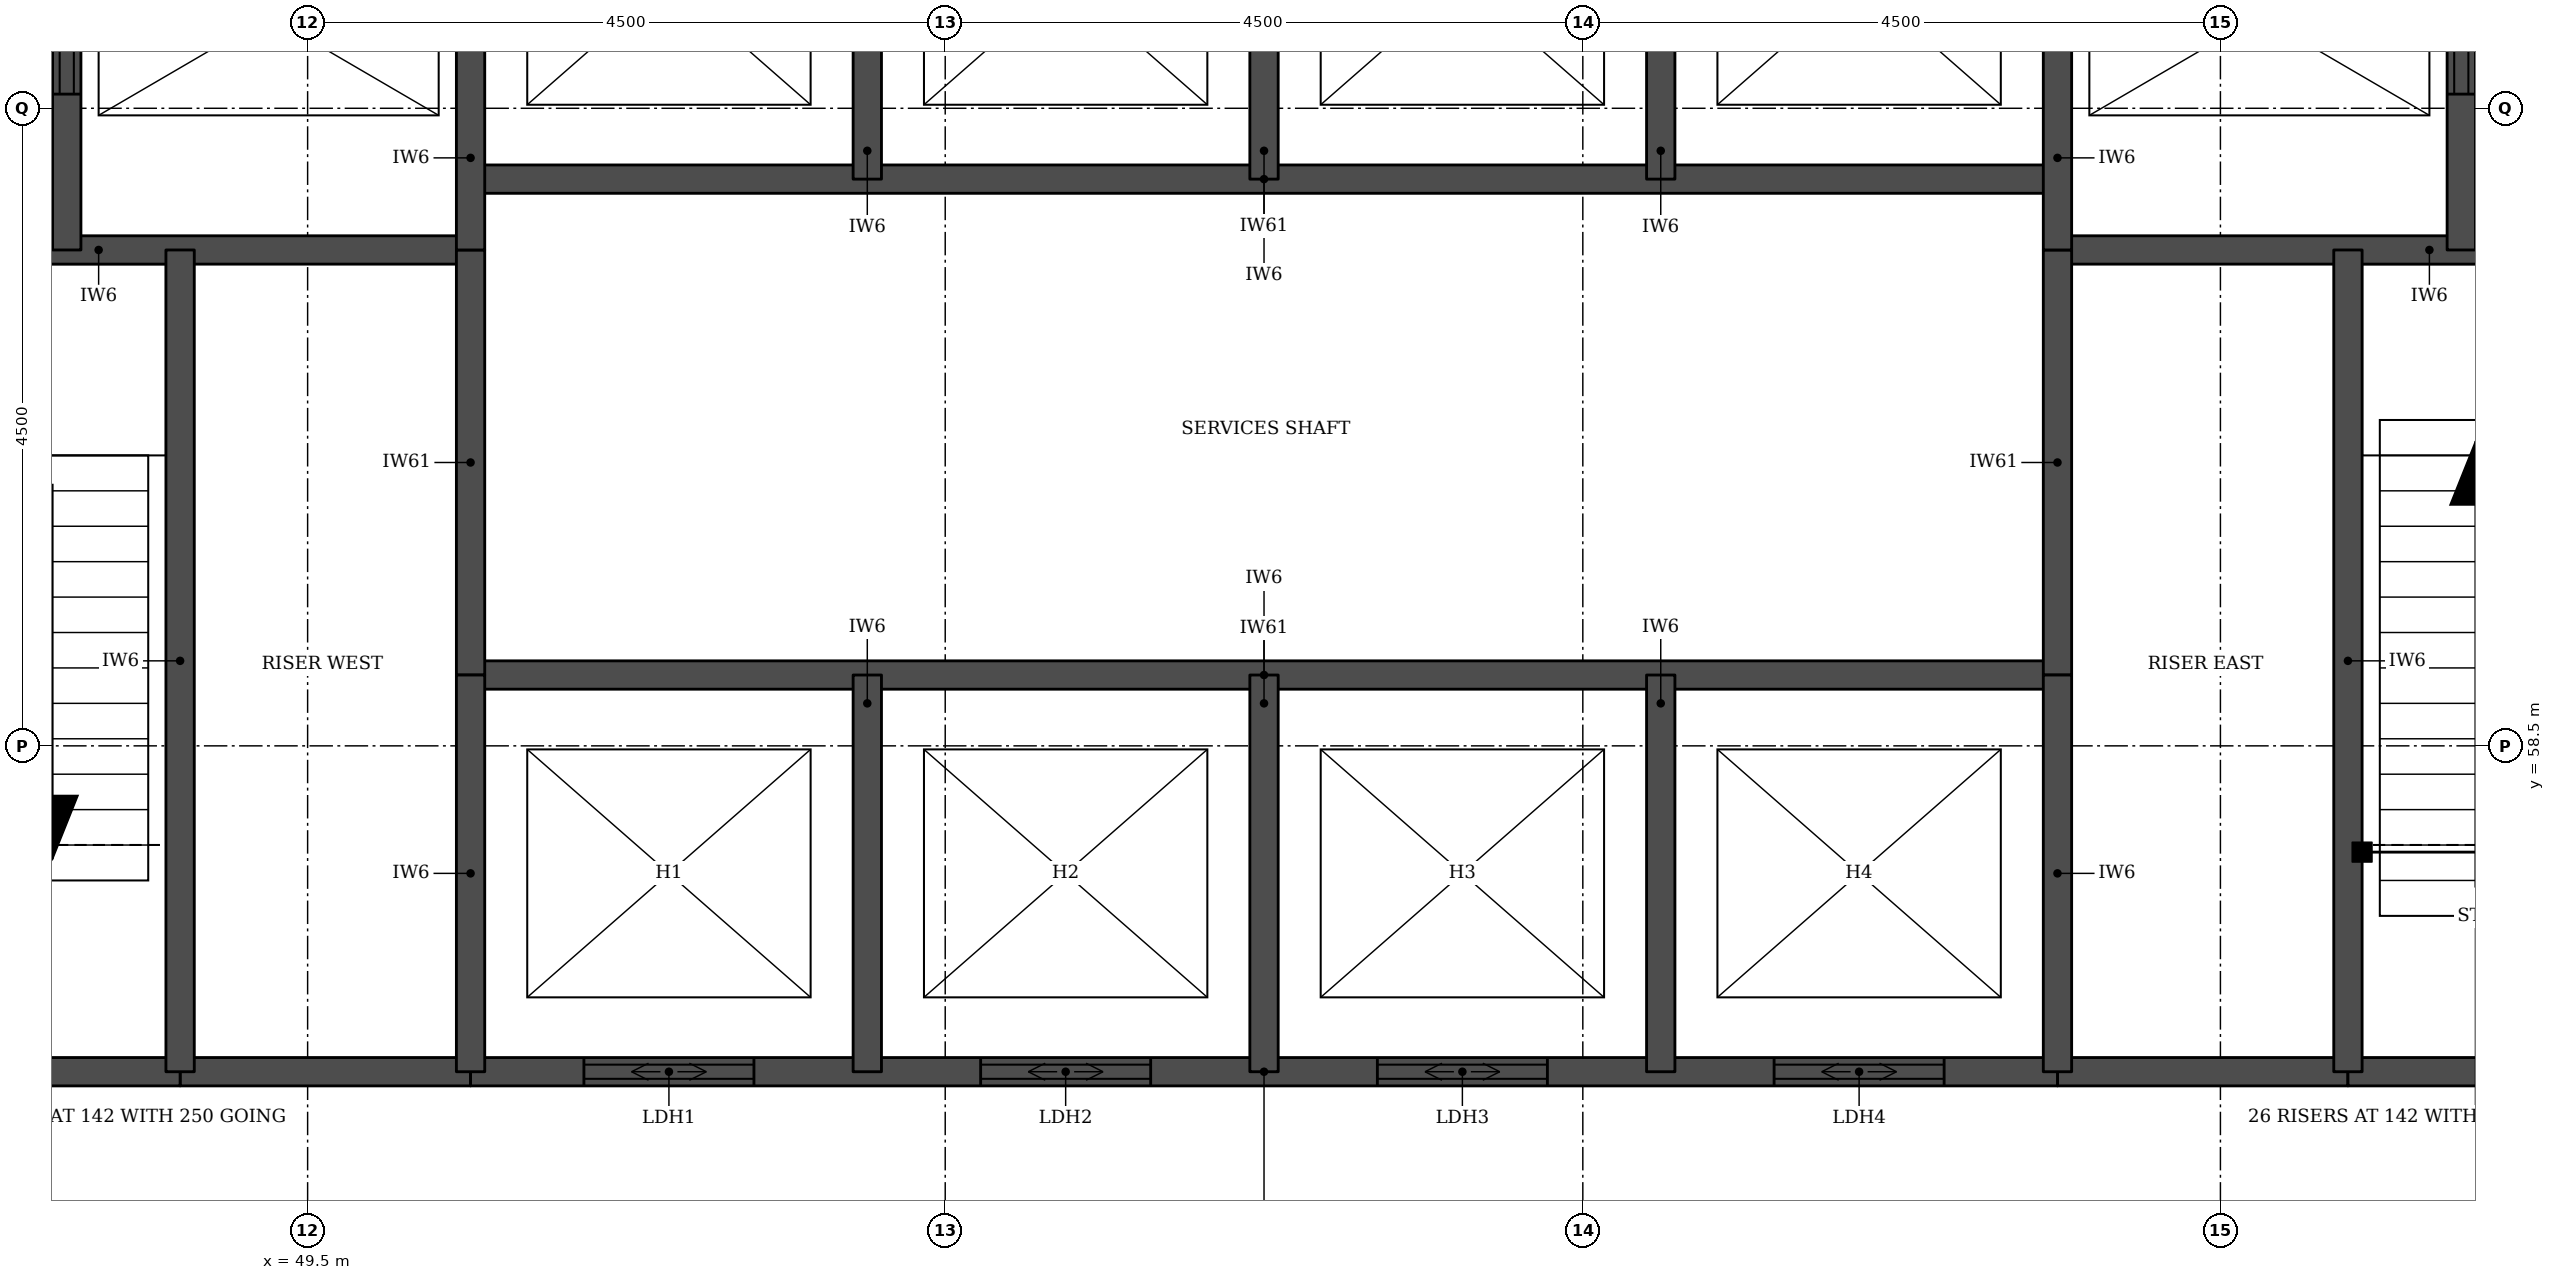
"""IFC4 building model, lengths in metres.
Left out: names, types, materials, properties, quantities, classifications, styles, units other than length and angle.
Written with IfcOpenShell. Run it as: python <this file> out.ifc"""

import sys

from ifc_helpers import new_model, si_unit, direction, frame, frame_2d, origin, place, context, subcontext, project, spatial, rectangle, extrude, element, fill, save


model = new_model("IFC4")
c1 = context("Model", 3, precision=1e-05, world=origin(), true_north=direction((0.0, 1.0)))
c2 = subcontext(c1, "Body", "Model", "MODEL_VIEW")
j1 = project(units=[si_unit("LENGTHUNIT", "METRE"), si_unit("PLANEANGLEUNIT", "RADIAN")], contexts=[c1])
p1 = place(None, origin())
s1 = spatial("IfcSite", under=j1, at=p1, CompositionType="ELEMENT")
p2 = place(p1, origin())
s2 = spatial("IfcBuilding", under=s1, at=p2, CompositionType="ELEMENT")
p3 = place(p2, frame((0.0, 0.0, 211.9)))
s3 = spatial("IfcBuildingStorey", under=s2, at=p3, CompositionType="ELEMENT", Elevation=211.9)
for number, where, z_axis, x_axis in (
    (1, (48.6, 56.2, 0.0), (0.0, 0.0, 1.0), (1.0, 0.0, 0.0)),
    (2, (61.85, 56.2, 0.0), (0.0, 0.0, 1.0), (1.0, 0.0, 0.0)),
):
    element("IfcWall", number, at=place(p3, frame(where, z_axis=z_axis, x_axis=x_axis)), inside=s3, PredefinedType="SOLIDWALL", context=c2, shape_type="SweptSolid", body=[
        extrude(rectangle(XDim=2.05, YDim=0.2, at=frame_2d((1.025, 0.0))), origin(), (0.0, 0.0, 1.0), 3.55),
    ])
p4 = place(p3, frame((45.4, 56.2, 0.0), z_axis=(0.0, 0.0, 1.0), x_axis=(1.0, 0.0, 0.0)))
e3 = element("IfcWall", 3, at=p4, inside=s3, PredefinedType="SOLIDWALL", context=c2, shape_type="SweptSolid", body=[
    extrude(rectangle(XDim=3.2, YDim=0.2, at=frame_2d((1.6, 0.0))), origin(), (0.0, 0.0, 1.0), 3.55),
])
p5 = place(p3, frame((50.65, 56.2, 0.0), z_axis=(0.0, 0.0, 1.0), x_axis=(1.0, 0.0, 0.0)))
e4 = element("IfcWall", 4, at=p5, inside=s3, PredefinedType="SOLIDWALL", context=c2, shape_type="SweptSolid", body=[
    extrude(rectangle(XDim=11.2, YDim=0.2, at=frame_2d((5.6, 0.0))), origin(), (0.0, 0.0, 1.0), 3.55),
])
p6 = place(p5, frame((0.8, 0.0, 0.0)))
e5 = element("IfcOpeningElement", 5, at=p6, cuts=e4, PredefinedType="OPENING", context=c2, shape_type="SweptSolid", body=[
    extrude(rectangle(XDim=1.2, YDim=2.1, at=frame_2d((0.6, 1.05))), frame((0.0, 0.11, 0.0), z_axis=(0.0, -1.0, 0.0), x_axis=(1.0, 0.0, 0.0)), (0.0, 0.0, 1.0), 0.22),
])
p7 = place(p5, frame((3.6, 0.0, 0.0)))
e6 = element("IfcOpeningElement", 6, at=p7, cuts=e4, PredefinedType="OPENING", context=c2, shape_type="SweptSolid", body=[
    extrude(rectangle(XDim=1.2, YDim=2.1, at=frame_2d((0.6, 1.05))), frame((0.0, 0.11, 0.0), z_axis=(0.0, -1.0, 0.0), x_axis=(1.0, 0.0, 0.0)), (0.0, 0.0, 1.0), 0.22),
])
p8 = place(p5, frame((6.4, 0.0, 0.0)))
e7 = element("IfcOpeningElement", 7, at=p8, cuts=e4, PredefinedType="OPENING", context=c2, shape_type="SweptSolid", body=[
    extrude(rectangle(XDim=1.2, YDim=2.1, at=frame_2d((0.6, 1.05))), frame((0.0, 0.11, 0.0), z_axis=(0.0, -1.0, 0.0), x_axis=(1.0, 0.0, 0.0)), (0.0, 0.0, 1.0), 0.22),
])
p9 = place(p5, frame((9.2, 0.0, 0.0)))
e8 = element("IfcOpeningElement", 8, at=p9, cuts=e4, PredefinedType="OPENING", context=c2, shape_type="SweptSolid", body=[
    extrude(rectangle(XDim=1.2, YDim=2.1, at=frame_2d((0.6, 1.05))), frame((0.0, 0.11, 0.0), z_axis=(0.0, -1.0, 0.0), x_axis=(1.0, 0.0, 0.0)), (0.0, 0.0, 1.0), 0.22),
])
p10 = place(p3, frame((63.9, 56.2, 0.0), z_axis=(0.0, 0.0, 1.0), x_axis=(1.0, 0.0, 0.0)))
e9 = element("IfcWall", 9, at=p10, inside=s3, PredefinedType="SOLIDWALL", context=c2, shape_type="SweptSolid", body=[
    extrude(rectangle(XDim=3.2, YDim=0.2, at=frame_2d((1.6, 0.0))), origin(), (0.0, 0.0, 1.0), 3.55),
])
p11 = place(p3, frame((50.65, 59.0, 0.0), z_axis=(0.0, 0.0, 1.0), x_axis=(1.0, 0.0, 0.0)))
e10 = element("IfcWall", 10, at=p11, inside=s3, PredefinedType="SOLIDWALL", context=c2, shape_type="SweptSolid", body=[
    extrude(rectangle(XDim=11.2, YDim=0.2, at=frame_2d((5.6, 0.0))), origin(), (0.0, 0.0, 1.0), 3.7),
])
for number, where, z_axis, x_axis in (
    (11, (45.4, 62.0, 0.0), (0.0, 0.0, 1.0), (1.0, 0.0, 0.0)),
    (12, (61.85, 62.0, 0.0), (0.0, 0.0, 1.0), (1.0, 0.0, 0.0)),
):
    element("IfcWall", number, at=place(p3, frame(where, z_axis=z_axis, x_axis=x_axis)), inside=s3, PredefinedType="SOLIDWALL", context=c2, shape_type="SweptSolid", body=[
        extrude(rectangle(XDim=5.25, YDim=0.2, at=frame_2d((2.625, 0.0))), origin(), (0.0, 0.0, 1.0), 3.55),
    ])
p12 = place(p3, frame((50.65, 62.5, 0.0), z_axis=(0.0, 0.0, 1.0), x_axis=(1.0, 0.0, 0.0)))
e13 = element("IfcWall", 13, at=p12, inside=s3, PredefinedType="SOLIDWALL", context=c2, shape_type="SweptSolid", body=[
    extrude(rectangle(XDim=11.2, YDim=0.2, at=frame_2d((5.6, 0.0))), origin(), (0.0, 0.0, 1.0), 3.7),
])
p13 = place(p3, frame((47.8, 62.0, 0.0), z_axis=(0.0, 0.0, 1.0), x_axis=(0.0, 1.0, 0.0)))
e14 = element("IfcWall", 14, at=p13, inside=s3, PredefinedType="SOLIDWALL", context=c2, shape_type="SweptSolid", body=[
    extrude(rectangle(XDim=3.3, YDim=0.2, at=frame_2d((1.65, 0.0))), origin(), (0.0, 0.0, 1.0), 3.55),
])
p14 = place(p13, frame((1.1, 0.0, 0.0)))
e15 = element("IfcOpeningElement", 15, at=p14, cuts=e14, PredefinedType="OPENING", context=c2, shape_type="SweptSolid", body=[
    extrude(rectangle(XDim=1.1, YDim=2.1, at=frame_2d((0.55, 1.05))), frame((0.0, 0.11, 0.0), z_axis=(0.0, -1.0, 0.0), x_axis=(1.0, 0.0, 0.0)), (0.0, 0.0, 1.0), 0.22),
])
p15 = place(p3, frame((48.6, 56.2, 0.0), z_axis=(0.0, 0.0, 1.0), x_axis=(0.0, 1.0, 0.0)))
e16 = element("IfcWall", 16, at=p15, inside=s3, PredefinedType="SOLIDWALL", context=c2, shape_type="SweptSolid", body=[
    extrude(rectangle(XDim=5.8, YDim=0.2, at=frame_2d((2.9, 0.0))), origin(), (0.0, 0.0, 1.0), 3.55),
])
p16 = place(p3, frame((50.65, 59.0, 0.0), z_axis=(0.0, 0.0, 1.0), x_axis=(0.0, 1.0, 0.0)))
e17 = element("IfcWall", 17, at=p16, inside=s3, PredefinedType="SOLIDWALL", context=c2, shape_type="SweptSolid", body=[
    extrude(rectangle(XDim=3.0, YDim=0.2, at=frame_2d((1.5, 0.0))), origin(), (0.0, 0.0, 1.0), 3.7),
])
p17 = place(p3, frame((50.65, 56.2, 0.0), z_axis=(0.0, 0.0, 1.0), x_axis=(0.0, 1.0, 0.0)))
e18 = element("IfcWall", 18, at=p17, inside=s3, PredefinedType="SOLIDWALL", context=c2, shape_type="SweptSolid", body=[
    extrude(rectangle(XDim=2.8, YDim=0.2, at=frame_2d((1.4, 0.0))), origin(), (0.0, 0.0, 1.0), 3.55),
])
p18 = place(p3, frame((50.65, 62.0, 0.0), z_axis=(0.0, 0.0, 1.0), x_axis=(0.0, 1.0, 0.0)))
e19 = element("IfcWall", 19, at=p18, inside=s3, PredefinedType="SOLIDWALL", context=c2, shape_type="SweptSolid", body=[
    extrude(rectangle(XDim=3.3, YDim=0.2, at=frame_2d((1.65, 0.0))), origin(), (0.0, 0.0, 1.0), 3.55),
])
for number, where, z_axis, x_axis in (
    (20, (53.45, 56.2, 0.0), (0.0, 0.0, 1.0), (0.0, 1.0, 0.0)),
    (21, (53.45, 62.5, 0.0), (0.0, 0.0, 1.0), (0.0, 1.0, 0.0)),
    (22, (56.25, 56.2, 0.0), (0.0, 0.0, 1.0), (0.0, 1.0, 0.0)),
    (23, (56.25, 62.5, 0.0), (0.0, 0.0, 1.0), (0.0, 1.0, 0.0)),
    (24, (59.05, 56.2, 0.0), (0.0, 0.0, 1.0), (0.0, 1.0, 0.0)),
    (25, (59.05, 62.5, 0.0), (0.0, 0.0, 1.0), (0.0, 1.0, 0.0)),
):
    element("IfcWall", number, at=place(p3, frame(where, z_axis=z_axis, x_axis=x_axis)), inside=s3, PredefinedType="SOLIDWALL", context=c2, shape_type="SweptSolid", body=[
        extrude(rectangle(XDim=2.8, YDim=0.2, at=frame_2d((1.4, 0.0))), origin(), (0.0, 0.0, 1.0), 3.55),
    ])
p19 = place(p3, frame((61.85, 59.0, 0.0), z_axis=(0.0, 0.0, 1.0), x_axis=(0.0, 1.0, 0.0)))
e26 = element("IfcWall", 26, at=p19, inside=s3, PredefinedType="SOLIDWALL", context=c2, shape_type="SweptSolid", body=[
    extrude(rectangle(XDim=3.0, YDim=0.2, at=frame_2d((1.5, 0.0))), origin(), (0.0, 0.0, 1.0), 3.7),
])
p20 = place(p3, frame((61.85, 56.2, 0.0), z_axis=(0.0, 0.0, 1.0), x_axis=(0.0, 1.0, 0.0)))
e27 = element("IfcWall", 27, at=p20, inside=s3, PredefinedType="SOLIDWALL", context=c2, shape_type="SweptSolid", body=[
    extrude(rectangle(XDim=2.8, YDim=0.2, at=frame_2d((1.4, 0.0))), origin(), (0.0, 0.0, 1.0), 3.55),
])
p21 = place(p3, frame((61.85, 62.0, 0.0), z_axis=(0.0, 0.0, 1.0), x_axis=(0.0, 1.0, 0.0)))
e28 = element("IfcWall", 28, at=p21, inside=s3, PredefinedType="SOLIDWALL", context=c2, shape_type="SweptSolid", body=[
    extrude(rectangle(XDim=3.3, YDim=0.2, at=frame_2d((1.65, 0.0))), origin(), (0.0, 0.0, 1.0), 3.55),
])
p22 = place(p3, frame((63.9, 56.2, 0.0), z_axis=(0.0, 0.0, 1.0), x_axis=(0.0, 1.0, 0.0)))
e29 = element("IfcWall", 29, at=p22, inside=s3, PredefinedType="SOLIDWALL", context=c2, shape_type="SweptSolid", body=[
    extrude(rectangle(XDim=5.8, YDim=0.2, at=frame_2d((2.9, 0.0))), origin(), (0.0, 0.0, 1.0), 3.55),
])
p23 = place(p3, frame((64.7, 62.0, 0.0), z_axis=(0.0, 0.0, 1.0), x_axis=(0.0, 1.0, 0.0)))
e30 = element("IfcWall", 30, at=p23, inside=s3, PredefinedType="SOLIDWALL", context=c2, shape_type="SweptSolid", body=[
    extrude(rectangle(XDim=3.3, YDim=0.2, at=frame_2d((1.65, 0.0))), origin(), (0.0, 0.0, 1.0), 3.55),
])
p24 = place(p23, frame((1.1, 0.0, 0.0)))
e31 = element("IfcOpeningElement", 31, at=p24, cuts=e30, PredefinedType="OPENING", context=c2, shape_type="SweptSolid", body=[
    extrude(rectangle(XDim=1.1, YDim=2.1, at=frame_2d((0.55, 1.05))), frame((0.0, 0.11, 0.0), z_axis=(0.0, -1.0, 0.0), x_axis=(1.0, 0.0, 0.0)), (0.0, 0.0, 1.0), 0.22),
])
p25 = place(p6, origin())
e32 = element("IfcDoor", 32, at=p25, inside=s3, OperationType="DOUBLE_DOOR_SLIDING", PredefinedType="DOOR", context=c2, shape_type="SweptSolid", body=[
    extrude(rectangle(XDim=1.2, YDim=2.1, at=frame_2d((0.6, 1.05))), frame((0.0, 0.025, 0.0), z_axis=(0.0, -1.0, 0.0), x_axis=(1.0, 0.0, 0.0)), (0.0, 0.0, 1.0), 0.05),
])
fill(e5, e32)
p26 = place(p7, origin())
e33 = element("IfcDoor", 33, at=p26, inside=s3, OperationType="DOUBLE_DOOR_SLIDING", PredefinedType="DOOR", context=c2, shape_type="SweptSolid", body=[
    extrude(rectangle(XDim=1.2, YDim=2.1, at=frame_2d((0.6, 1.05))), frame((0.0, 0.025, 0.0), z_axis=(0.0, -1.0, 0.0), x_axis=(1.0, 0.0, 0.0)), (0.0, 0.0, 1.0), 0.05),
])
fill(e6, e33)
p27 = place(p8, origin())
e34 = element("IfcDoor", 34, at=p27, inside=s3, OperationType="DOUBLE_DOOR_SLIDING", PredefinedType="DOOR", context=c2, shape_type="SweptSolid", body=[
    extrude(rectangle(XDim=1.2, YDim=2.1, at=frame_2d((0.6, 1.05))), frame((0.0, 0.025, 0.0), z_axis=(0.0, -1.0, 0.0), x_axis=(1.0, 0.0, 0.0)), (0.0, 0.0, 1.0), 0.05),
])
fill(e7, e34)
p28 = place(p9, origin())
e35 = element("IfcDoor", 35, at=p28, inside=s3, OperationType="DOUBLE_DOOR_SLIDING", PredefinedType="DOOR", context=c2, shape_type="SweptSolid", body=[
    extrude(rectangle(XDim=1.2, YDim=2.1, at=frame_2d((0.6, 1.05))), frame((0.0, 0.025, 0.0), z_axis=(0.0, -1.0, 0.0), x_axis=(1.0, 0.0, 0.0)), (0.0, 0.0, 1.0), 0.05),
])
fill(e8, e35)
p29 = place(p14, origin())
e36 = element("IfcDoor", 36, at=p29, inside=s3, OperationType="DOUBLE_DOOR_SLIDING", PredefinedType="DOOR", context=c2, shape_type="SweptSolid", body=[
    extrude(rectangle(XDim=1.1, YDim=2.1, at=frame_2d((0.55, 1.05))), frame((0.0, 0.025, 0.0), z_axis=(0.0, -1.0, 0.0), x_axis=(1.0, 0.0, 0.0)), (0.0, 0.0, 1.0), 0.05),
])
fill(e15, e36)
p30 = place(p24, origin())
e37 = element("IfcDoor", 37, at=p30, inside=s3, OperationType="DOUBLE_DOOR_SLIDING", PredefinedType="DOOR", context=c2, shape_type="SweptSolid", body=[
    extrude(rectangle(XDim=1.1, YDim=2.1, at=frame_2d((0.55, 1.05))), frame((0.0, 0.025, 0.0), z_axis=(0.0, -1.0, 0.0), x_axis=(1.0, 0.0, 0.0)), (0.0, 0.0, 1.0), 0.05),
])
fill(e31, e37)
save(model, sys.argv[1])
